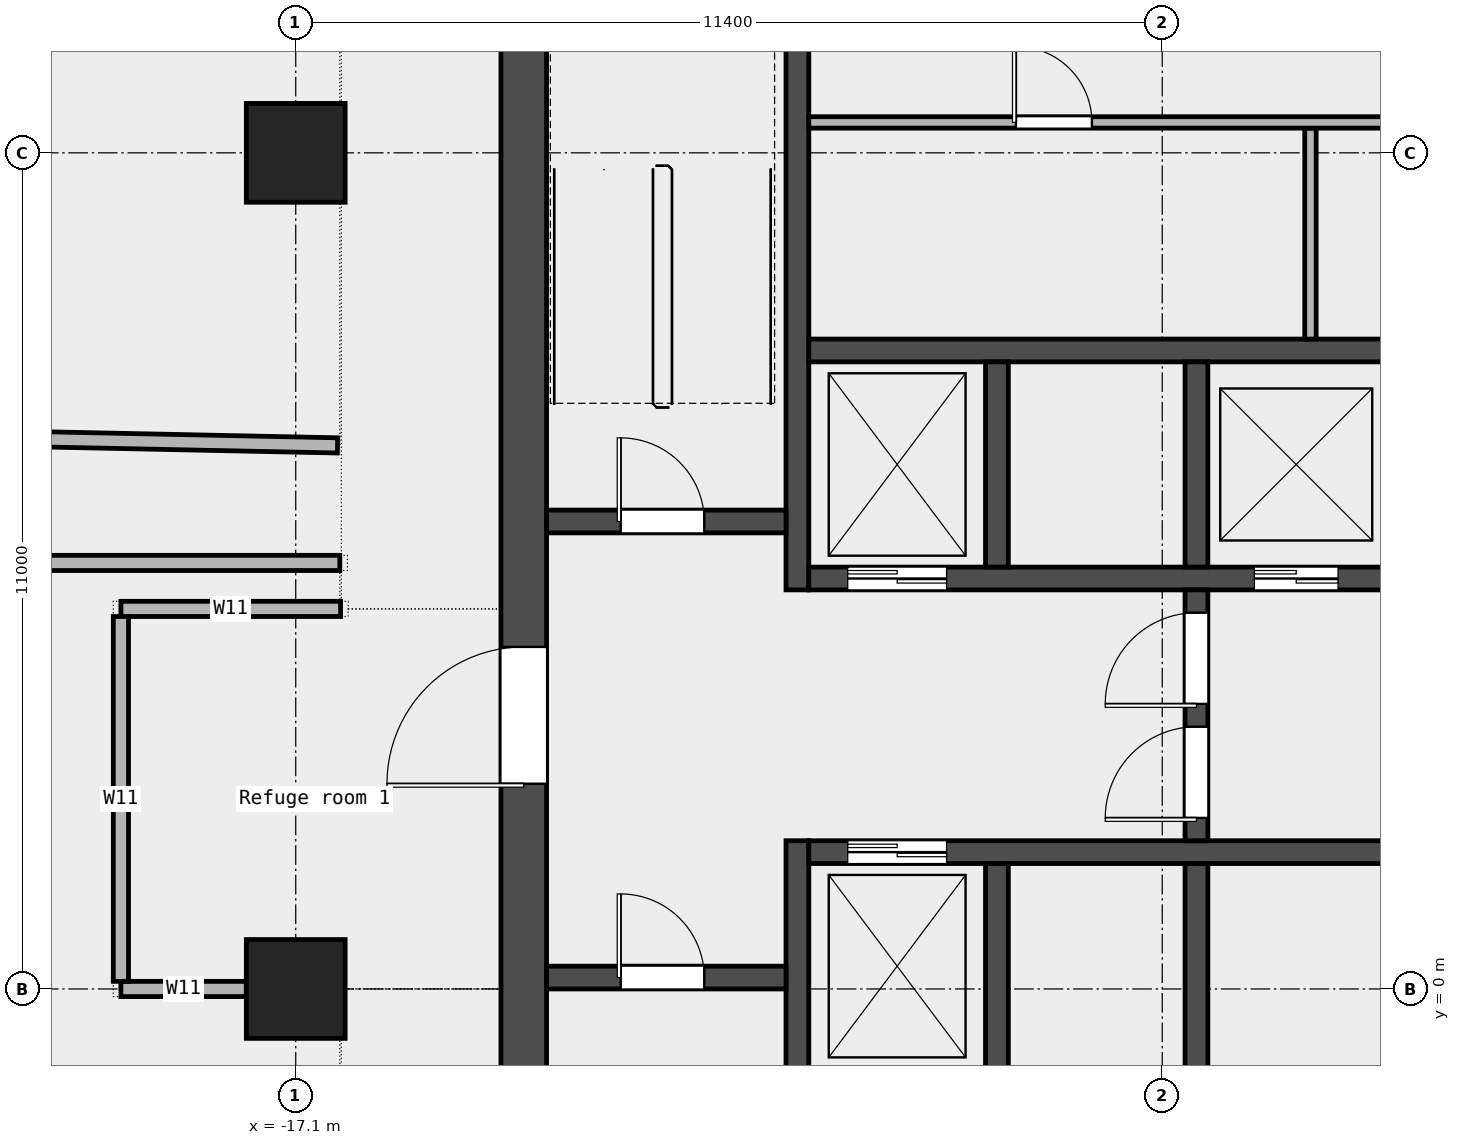
"""IFC4 building model, lengths in metres.
Left out: names, types, materials, properties, quantities, classifications, styles, units other than length and angle.
Written with IfcOpenShell. Run it as: python <this file> out.ifc"""

import sys

from ifc_helpers import new_model, si_unit, direction, frame, frame_2d, origin, origin_2d, place, context, subcontext, project, spatial, rectangle, extrude, element, fill, save


model = new_model("IFC4")
c1 = context("Model", 3, precision=1e-05, world=origin(), true_north=direction((0.0, 1.0)))
c2 = subcontext(c1, "Body", "Model", "MODEL_VIEW")
j1 = project(units=[si_unit("LENGTHUNIT", "METRE"), si_unit("PLANEANGLEUNIT", "RADIAN")], contexts=[c1])
p1 = place(None, origin())
s1 = spatial("IfcSite", under=j1, at=p1, CompositionType="ELEMENT")
p2 = place(p1, origin())
s2 = spatial("IfcBuilding", under=s1, at=p2, CompositionType="ELEMENT")
p3 = place(p2, frame((0.0, 0.0, 259.0)))
s3 = spatial("IfcBuildingStorey", under=s2, at=p3, CompositionType="ELEMENT", Elevation=259.0)
for number, where, z_axis, x_axis in (
    (1, (-17.1, 0.0, 0.0), (0.0, 0.0, 1.0), (1.0, 0.0, 0.0)),
    (2, (-17.1, 11.0, 0.0), (0.0, 0.0, 1.0), (1.0, 0.0, 0.0)),
):
    element("IfcColumn", number, at=place(p3, frame(where, z_axis=z_axis, x_axis=x_axis)), inside=s3, PredefinedType="COLUMN", context=c2, shape_type="SweptSolid", body=[
        extrude(rectangle(XDim=1.3, YDim=1.3, at=origin_2d()), origin(), (0.0, 0.0, 1.0), 8.0),
    ])
p4 = place(p3, frame((-19.4, 0.0, 0.0), z_axis=(0.0, 0.0, 1.0), x_axis=(1.0, 0.0, 0.0)))
e3 = element("IfcWall", 3, at=p4, inside=s3, PredefinedType="PARTITIONING", context=c2, shape_type="SweptSolid", body=[
    extrude(rectangle(XDim=1.65, YDim=0.2, at=frame_2d((0.825, 0.0))), origin(), (0.0, 0.0, 1.0), 8.0),
])
p5 = place(p3, frame((-19.4, 5.0, 0.0), z_axis=(0.0, 0.0, 1.0), x_axis=(1.0, 0.0, 0.0)))
e4 = element("IfcWall", 4, at=p5, inside=s3, PredefinedType="PARTITIONING", context=c2, shape_type="SweptSolid", body=[
    extrude(rectangle(XDim=2.89, YDim=0.2, at=frame_2d((1.445, 0.0))), origin(), (0.0, 0.0, 1.0), 8.0),
])
p6 = place(p3, frame((-26.45, 5.605, 0.0), z_axis=(0.0, 0.0, 1.0), x_axis=(1.0, 0.0, 0.0)))
e5 = element("IfcWall", 5, at=p6, inside=s3, PredefinedType="PARTITIONING", context=c2, shape_type="SweptSolid", body=[
    extrude(rectangle(XDim=9.93, YDim=0.2, at=frame_2d((4.965, 0.0))), origin(), (0.0, 0.0, 1.0), 8.0),
])
p7 = place(p3, frame((-19.4, 0.1, 0.0), z_axis=(0.0, 0.0, 1.0), x_axis=(0.0, 1.0, 0.0)))
e6 = element("IfcWall", 6, at=p7, inside=s3, PredefinedType="PARTITIONING", context=c2, shape_type="SweptSolid", body=[
    extrude(rectangle(XDim=4.8, YDim=0.2, at=frame_2d((2.4, 0.0))), origin(), (0.0, 0.0, 1.0), 8.0),
])
p8 = place(p3, frame((-16.55, 7.151, 0.0), z_axis=(0.0, 0.0, 1.0), x_axis=(-0.999787325343, 0.020622901905, 0.0)))
e7 = element("IfcWall", 7, at=p8, inside=s3, PredefinedType="PARTITIONING", context=c2, shape_type="SweptSolid", body=[
    extrude(rectangle(XDim=9.802, YDim=0.2, at=frame_2d((4.901, 0.0))), origin(), (0.0, 0.0, 1.0), 8.0),
])
p9 = place(p3, frame((-14.1, -6.6, 0.0), z_axis=(0.0, 0.0, 1.0), x_axis=(0.0, 1.0, 0.0)))
e8 = element("IfcWall", 8, at=p9, inside=s3, PredefinedType="SHEAR", context=c2, shape_type="SweptSolid", body=[
    extrude(rectangle(XDim=19.5, YDim=0.6, at=frame_2d((9.75, 0.0))), origin(), (0.0, 0.0, 1.0), 8.1),
])
p10 = place(p9, frame((9.3, 0.0, 0.0)))
e9 = element("IfcOpeningElement", 9, at=p10, cuts=e8, PredefinedType="OPENING", context=c2, shape_type="SweptSolid", body=[
    extrude(rectangle(XDim=1.8, YDim=2.1, at=frame_2d((0.9, 1.05))), frame((0.0, 0.312, 0.0), z_axis=(0.0, -1.0, 0.0), x_axis=(1.0, 0.0, 0.0)), (0.0, 0.0, 1.0), 0.624),
])
p11 = place(p3, frame((-10.5, -6.6, 0.0), z_axis=(0.0, 0.0, 1.0), x_axis=(0.0, 1.0, 0.0)))
e10 = element("IfcWall", 10, at=p11, inside=s3, PredefinedType="SHEAR", context=c2, shape_type="SweptSolid", body=[
    extrude(rectangle(XDim=8.55, YDim=0.3, at=frame_2d((4.275, 0.0))), origin(), (0.0, 0.0, 1.0), 8.1),
])
p12 = place(p3, frame((-10.5, 5.25, 0.0), z_axis=(0.0, 0.0, 1.0), x_axis=(0.0, 1.0, 0.0)))
e11 = element("IfcWall", 11, at=p12, inside=s3, PredefinedType="SHEAR", context=c2, shape_type="SweptSolid", body=[
    extrude(rectangle(XDim=7.65, YDim=0.3, at=frame_2d((3.825, 0.0))), origin(), (0.0, 0.0, 1.0), 8.1),
])
p13 = place(p3, frame((-13.8, 0.15, 0.0), z_axis=(0.0, 0.0, 1.0), x_axis=(1.0, 0.0, 0.0)))
e12 = element("IfcWall", 12, at=p13, inside=s3, PredefinedType="SOLIDWALL", context=c2, shape_type="SweptSolid", body=[
    extrude(rectangle(XDim=3.15, YDim=0.3, at=frame_2d((1.575, 0.0))), origin(), (0.0, 0.0, 1.0), 8.1),
])
p14 = place(p13, frame((0.975, 0.0, 0.0)))
e13 = element("IfcOpeningElement", 13, at=p14, cuts=e12, PredefinedType="OPENING", context=c2, shape_type="SweptSolid", body=[
    extrude(rectangle(XDim=1.1, YDim=2.1, at=frame_2d((0.55, 1.05))), frame((0.0, 0.162, 0.0), z_axis=(0.0, -1.0, 0.0), x_axis=(1.0, 0.0, 0.0)), (0.0, 0.0, 1.0), 0.324),
])
p15 = place(p3, frame((-13.8, 6.15, 0.0), z_axis=(0.0, 0.0, 1.0), x_axis=(1.0, 0.0, 0.0)))
e14 = element("IfcWall", 14, at=p15, inside=s3, PredefinedType="SOLIDWALL", context=c2, shape_type="SweptSolid", body=[
    extrude(rectangle(XDim=3.15, YDim=0.3, at=frame_2d((1.575, 0.0))), origin(), (0.0, 0.0, 1.0), 8.1),
])
p16 = place(p15, frame((0.975, 0.0, 0.0)))
e15 = element("IfcOpeningElement", 15, at=p16, cuts=e14, PredefinedType="OPENING", context=c2, shape_type="SweptSolid", body=[
    extrude(rectangle(XDim=1.1, YDim=2.1, at=frame_2d((0.55, 1.05))), frame((0.0, 0.162, 0.0), z_axis=(0.0, -1.0, 0.0), x_axis=(1.0, 0.0, 0.0)), (0.0, 0.0, 1.0), 0.324),
])
p17 = place(p3, frame((-10.35, 1.8, 0.0), z_axis=(0.0, 0.0, 1.0), x_axis=(1.0, 0.0, 0.0)))
e16 = element("IfcWall", 16, at=p17, inside=s3, PredefinedType="SOLIDWALL", context=c2, shape_type="SweptSolid", body=[
    extrude(rectangle(XDim=20.7, YDim=0.3, at=frame_2d((10.35, 0.0))), origin(), (0.0, 0.0, 1.0), 8.1),
])
p18 = place(p17, frame((0.512, 0.0, 0.0)))
e17 = element("IfcOpeningElement", 17, at=p18, cuts=e16, PredefinedType="OPENING", context=c2, shape_type="SweptSolid", body=[
    extrude(rectangle(XDim=1.3, YDim=2.1, at=frame_2d((0.65, 1.05))), frame((0.0, 0.162, 0.0), z_axis=(0.0, -1.0, 0.0), x_axis=(1.0, 0.0, 0.0)), (0.0, 0.0, 1.0), 0.324),
])
p19 = place(p17, frame((8.538, 0.0, 0.0)))
e18 = element("IfcOpeningElement", 18, at=p19, cuts=e16, PredefinedType="OPENING", context=c2, shape_type="SweptSolid", body=[
    extrude(rectangle(XDim=1.0, YDim=2.1, at=frame_2d((0.5, 1.05))), frame((0.0, 0.162, 0.0), z_axis=(0.0, -1.0, 0.0), x_axis=(1.0, 0.0, 0.0)), (0.0, 0.0, 1.0), 0.324),
])
p20 = place(p17, frame((15.1, 0.0, 0.0)))
e19 = element("IfcOpeningElement", 19, at=p20, cuts=e16, PredefinedType="OPENING", context=c2, shape_type="SweptSolid", body=[
    extrude(rectangle(XDim=1.0, YDim=2.1, at=frame_2d((0.5, 1.05))), frame((0.0, 0.162, 0.0), z_axis=(0.0, -1.0, 0.0), x_axis=(1.0, 0.0, 0.0)), (0.0, 0.0, 1.0), 0.324),
])
p21 = place(p17, frame((19.038, 0.0, 0.0)))
e20 = element("IfcOpeningElement", 20, at=p21, cuts=e16, PredefinedType="OPENING", context=c2, shape_type="SweptSolid", body=[
    extrude(rectangle(XDim=1.0, YDim=2.1, at=frame_2d((0.5, 1.05))), frame((0.0, 0.162, 0.0), z_axis=(0.0, -1.0, 0.0), x_axis=(1.0, 0.0, 0.0)), (0.0, 0.0, 1.0), 0.324),
])
p22 = place(p3, frame((-10.35, 5.4, 0.0), z_axis=(0.0, 0.0, 1.0), x_axis=(1.0, 0.0, 0.0)))
e21 = element("IfcWall", 21, at=p22, inside=s3, PredefinedType="SOLIDWALL", context=c2, shape_type="SweptSolid", body=[
    extrude(rectangle(XDim=20.7, YDim=0.3, at=frame_2d((10.35, 0.0))), origin(), (0.0, 0.0, 1.0), 8.1),
])
p23 = place(p22, frame((0.512, 0.0, 0.0)))
e22 = element("IfcOpeningElement", 22, at=p23, cuts=e21, PredefinedType="OPENING", context=c2, shape_type="SweptSolid", body=[
    extrude(rectangle(XDim=1.3, YDim=2.1, at=frame_2d((0.65, 1.05))), frame((0.0, 0.162, 0.0), z_axis=(0.0, -1.0, 0.0), x_axis=(1.0, 0.0, 0.0)), (0.0, 0.0, 1.0), 0.324),
])
p24 = place(p22, frame((5.863, 0.0, 0.0)))
e23 = element("IfcOpeningElement", 23, at=p24, cuts=e21, PredefinedType="OPENING", context=c2, shape_type="SweptSolid", body=[
    extrude(rectangle(XDim=1.1, YDim=2.1, at=frame_2d((0.55, 1.05))), frame((0.0, 0.162, 0.0), z_axis=(0.0, -1.0, 0.0), x_axis=(1.0, 0.0, 0.0)), (0.0, 0.0, 1.0), 0.324),
])
p25 = place(p22, frame((8.488, 0.0, 0.0)))
e24 = element("IfcOpeningElement", 24, at=p25, cuts=e21, PredefinedType="OPENING", context=c2, shape_type="SweptSolid", body=[
    extrude(rectangle(XDim=1.1, YDim=2.1, at=frame_2d((0.55, 1.05))), frame((0.0, 0.162, 0.0), z_axis=(0.0, -1.0, 0.0), x_axis=(1.0, 0.0, 0.0)), (0.0, 0.0, 1.0), 0.324),
])
p26 = place(p22, frame((11.113, 0.0, 0.0)))
e25 = element("IfcOpeningElement", 25, at=p26, cuts=e21, PredefinedType="OPENING", context=c2, shape_type="SweptSolid", body=[
    extrude(rectangle(XDim=1.1, YDim=2.1, at=frame_2d((0.55, 1.05))), frame((0.0, 0.162, 0.0), z_axis=(0.0, -1.0, 0.0), x_axis=(1.0, 0.0, 0.0)), (0.0, 0.0, 1.0), 0.324),
])
p27 = place(p22, frame((13.738, 0.0, 0.0)))
e26 = element("IfcOpeningElement", 26, at=p27, cuts=e21, PredefinedType="OPENING", context=c2, shape_type="SweptSolid", body=[
    extrude(rectangle(XDim=1.1, YDim=2.1, at=frame_2d((0.55, 1.05))), frame((0.0, 0.162, 0.0), z_axis=(0.0, -1.0, 0.0), x_axis=(1.0, 0.0, 0.0)), (0.0, 0.0, 1.0), 0.324),
])
p28 = place(p22, frame((16.363, 0.0, 0.0)))
e27 = element("IfcOpeningElement", 27, at=p28, cuts=e21, PredefinedType="OPENING", context=c2, shape_type="SweptSolid", body=[
    extrude(rectangle(XDim=1.1, YDim=2.1, at=frame_2d((0.55, 1.05))), frame((0.0, 0.162, 0.0), z_axis=(0.0, -1.0, 0.0), x_axis=(1.0, 0.0, 0.0)), (0.0, 0.0, 1.0), 0.324),
])
p29 = place(p22, frame((18.988, 0.0, 0.0)))
e28 = element("IfcOpeningElement", 28, at=p29, cuts=e21, PredefinedType="OPENING", context=c2, shape_type="SweptSolid", body=[
    extrude(rectangle(XDim=1.1, YDim=2.1, at=frame_2d((0.55, 1.05))), frame((0.0, 0.162, 0.0), z_axis=(0.0, -1.0, 0.0), x_axis=(1.0, 0.0, 0.0)), (0.0, 0.0, 1.0), 0.324),
])
p30 = place(p3, frame((-10.35, 8.4, 0.0), z_axis=(0.0, 0.0, 1.0), x_axis=(1.0, 0.0, 0.0)))
e29 = element("IfcWall", 29, at=p30, inside=s3, PredefinedType="SOLIDWALL", context=c2, shape_type="SweptSolid", body=[
    extrude(rectangle(XDim=20.7, YDim=0.3, at=frame_2d((10.35, 0.0))), origin(), (0.0, 0.0, 1.0), 8.1),
])
for number, where, z_axis, x_axis in (
    (30, (-7.875, -1.05, 0.0), (0.0, 0.0, 1.0), (0.0, 1.0, 0.0)),
    (31, (-5.25, -1.05, 0.0), (0.0, 0.0, 1.0), (0.0, 1.0, 0.0)),
    (32, (-7.875, 5.55, 0.0), (0.0, 0.0, 1.0), (0.0, 1.0, 0.0)),
    (33, (-5.25, 5.55, 0.0), (0.0, 0.0, 1.0), (0.0, 1.0, 0.0)),
):
    element("IfcWall", number, at=place(p3, frame(where, z_axis=z_axis, x_axis=x_axis)), inside=s3, PredefinedType="SOLIDWALL", context=c2, shape_type="SweptSolid", body=[
        extrude(rectangle(XDim=2.7, YDim=0.3, at=frame_2d((1.35, 0.0))), origin(), (0.0, 0.0, 1.0), 8.1),
    ])
p31 = place(p3, frame((-5.25, 1.95, 0.0), z_axis=(0.0, 0.0, 1.0), x_axis=(0.0, 1.0, 0.0)))
e34 = element("IfcWall", 34, at=p31, inside=s3, PredefinedType="SOLIDWALL", context=c2, shape_type="SweptSolid", body=[
    extrude(rectangle(XDim=3.3, YDim=0.3, at=frame_2d((1.65, 0.0))), origin(), (0.0, 0.0, 1.0), 8.1),
])
p32 = place(p31, frame((0.3, 0.0, 0.0)))
e35 = element("IfcOpeningElement", 35, at=p32, cuts=e34, PredefinedType="OPENING", context=c2, shape_type="SweptSolid", body=[
    extrude(rectangle(XDim=1.2, YDim=2.1, at=frame_2d((0.6, 1.05))), frame((0.0, 0.162, 0.0), z_axis=(0.0, -1.0, 0.0), x_axis=(1.0, 0.0, 0.0)), (0.0, 0.0, 1.0), 0.324),
])
p33 = place(p31, frame((1.8, 0.0, 0.0)))
e36 = element("IfcOpeningElement", 36, at=p33, cuts=e34, PredefinedType="OPENING", context=c2, shape_type="SweptSolid", body=[
    extrude(rectangle(XDim=1.2, YDim=2.1, at=frame_2d((0.6, 1.05))), frame((0.0, 0.162, 0.0), z_axis=(0.0, -1.0, 0.0), x_axis=(1.0, 0.0, 0.0)), (0.0, 0.0, 1.0), 0.324),
])
p34 = place(p3, frame((-3.75, 8.55, 0.0), z_axis=(0.0, 0.0, 1.0), x_axis=(0.0, 1.0, 0.0)))
e37 = element("IfcWall", 37, at=p34, inside=s3, PredefinedType="PARTITIONING", context=c2, shape_type="SweptSolid", body=[
    extrude(rectangle(XDim=2.775, YDim=0.15, at=frame_2d((1.387, 0.0))), origin(), (0.0, 0.0, 1.0), 8.1),
])
p35 = place(p3, frame((-10.35, 11.4, 0.0), z_axis=(0.0, 0.0, 1.0), x_axis=(1.0, 0.0, 0.0)))
e38 = element("IfcWall", 38, at=p35, inside=s3, PredefinedType="PARTITIONING", context=c2, shape_type="SweptSolid", body=[
    extrude(rectangle(XDim=20.7, YDim=0.15, at=frame_2d((10.35, 0.0))), origin(), (0.0, 0.0, 1.0), 8.1),
])
p36 = place(p35, frame((2.725, 0.0, 0.0)))
e39 = element("IfcOpeningElement", 39, at=p36, cuts=e38, PredefinedType="OPENING", context=c2, shape_type="SweptSolid", body=[
    extrude(rectangle(XDim=1.0, YDim=2.1, at=frame_2d((0.5, 1.05))), frame((0.0, 0.087, 0.0), z_axis=(0.0, -1.0, 0.0), x_axis=(1.0, 0.0, 0.0)), (0.0, 0.0, 1.0), 0.174),
])
p37 = place(p35, frame((9.475, 0.0, 0.0)))
e40 = element("IfcOpeningElement", 40, at=p37, cuts=e38, PredefinedType="OPENING", context=c2, shape_type="SweptSolid", body=[
    extrude(rectangle(XDim=1.0, YDim=2.1, at=frame_2d((0.5, 1.05))), frame((0.0, 0.087, 0.0), z_axis=(0.0, -1.0, 0.0), x_axis=(1.0, 0.0, 0.0)), (0.0, 0.0, 1.0), 0.174),
])
p38 = place(p35, frame((16.6, 0.0, 0.0)))
e41 = element("IfcOpeningElement", 41, at=p38, cuts=e38, PredefinedType="OPENING", context=c2, shape_type="SweptSolid", body=[
    extrude(rectangle(XDim=1.0, YDim=2.1, at=frame_2d((0.5, 1.05))), frame((0.0, 0.087, 0.0), z_axis=(0.0, -1.0, 0.0), x_axis=(1.0, 0.0, 0.0)), (0.0, 0.0, 1.0), 0.174),
])
p39 = place(p14, origin())
e42 = element("IfcDoor", 42, at=p39, inside=s3, OperationType="SINGLE_SWING_LEFT", PredefinedType="DOOR", context=c2, shape_type="SweptSolid", body=[
    extrude(rectangle(XDim=1.1, YDim=2.1, at=frame_2d((0.55, 1.05))), frame((0.0, 0.025, 0.0), z_axis=(0.0, -1.0, 0.0), x_axis=(1.0, 0.0, 0.0)), (0.0, 0.0, 1.0), 0.05),
])
fill(e13, e42)
p40 = place(p16, origin())
e43 = element("IfcDoor", 43, at=p40, inside=s3, OperationType="SINGLE_SWING_LEFT", PredefinedType="DOOR", context=c2, shape_type="SweptSolid", body=[
    extrude(rectangle(XDim=1.1, YDim=2.1, at=frame_2d((0.55, 1.05))), frame((0.0, 0.025, 0.0), z_axis=(0.0, -1.0, 0.0), x_axis=(1.0, 0.0, 0.0)), (0.0, 0.0, 1.0), 0.05),
])
fill(e15, e43)
p41 = place(p10, origin())
e44 = element("IfcDoor", 44, at=p41, inside=s3, OperationType="DOUBLE_DOOR_SINGLE_SWING", PredefinedType="DOOR", context=c2, shape_type="SweptSolid", body=[
    extrude(rectangle(XDim=1.8, YDim=2.1, at=frame_2d((0.9, 1.05))), frame((0.0, 0.025, 0.0), z_axis=(0.0, -1.0, 0.0), x_axis=(1.0, 0.0, 0.0)), (0.0, 0.0, 1.0), 0.05),
])
fill(e9, e44)
p42 = place(p32, origin())
e45 = element("IfcDoor", 45, at=p42, inside=s3, OperationType="SINGLE_SWING_LEFT", PredefinedType="DOOR", context=c2, shape_type="SweptSolid", body=[
    extrude(rectangle(XDim=1.2, YDim=2.1, at=frame_2d((0.6, 1.05))), frame((0.0, 0.025, 0.0), z_axis=(0.0, -1.0, 0.0), x_axis=(1.0, 0.0, 0.0)), (0.0, 0.0, 1.0), 0.05),
])
fill(e35, e45)
p43 = place(p33, origin())
e46 = element("IfcDoor", 46, at=p43, inside=s3, OperationType="SINGLE_SWING_RIGHT", PredefinedType="DOOR", context=c2, shape_type="SweptSolid", body=[
    extrude(rectangle(XDim=1.2, YDim=2.1, at=frame_2d((0.6, 1.05))), frame((0.0, 0.025, 0.0), z_axis=(0.0, -1.0, 0.0), x_axis=(1.0, 0.0, 0.0)), (0.0, 0.0, 1.0), 0.05),
])
fill(e36, e46)
p44 = place(p18, origin())
e47 = element("IfcDoor", 47, at=p44, inside=s3, OperationType="DOUBLE_DOOR_SLIDING", PredefinedType="DOOR", context=c2, shape_type="SweptSolid", body=[
    extrude(rectangle(XDim=1.3, YDim=2.1, at=frame_2d((0.65, 1.05))), frame((0.0, 0.025, 0.0), z_axis=(0.0, -1.0, 0.0), x_axis=(1.0, 0.0, 0.0)), (0.0, 0.0, 1.0), 0.05),
])
fill(e17, e47)
p45 = place(p23, origin())
e48 = element("IfcDoor", 48, at=p45, inside=s3, OperationType="DOUBLE_DOOR_SLIDING", PredefinedType="DOOR", context=c2, shape_type="SweptSolid", body=[
    extrude(rectangle(XDim=1.3, YDim=2.1, at=frame_2d((0.65, 1.05))), frame((0.0, 0.025, 0.0), z_axis=(0.0, -1.0, 0.0), x_axis=(1.0, 0.0, 0.0)), (0.0, 0.0, 1.0), 0.05),
])
fill(e22, e48)
p46 = place(p24, origin())
e49 = element("IfcDoor", 49, at=p46, inside=s3, OperationType="DOUBLE_DOOR_SLIDING", PredefinedType="DOOR", context=c2, shape_type="SweptSolid", body=[
    extrude(rectangle(XDim=1.1, YDim=2.1, at=frame_2d((0.55, 1.05))), frame((0.0, 0.025, 0.0), z_axis=(0.0, -1.0, 0.0), x_axis=(1.0, 0.0, 0.0)), (0.0, 0.0, 1.0), 0.05),
])
fill(e23, e49)
p47 = place(p36, origin())
e50 = element("IfcDoor", 50, at=p47, inside=s3, OperationType="SINGLE_SWING_LEFT", PredefinedType="DOOR", context=c2, shape_type="SweptSolid", body=[
    extrude(rectangle(XDim=1.0, YDim=2.1, at=frame_2d((0.5, 1.05))), frame((0.0, 0.025, 0.0), z_axis=(0.0, -1.0, 0.0), x_axis=(1.0, 0.0, 0.0)), (0.0, 0.0, 1.0), 0.05),
])
fill(e39, e50)
save(model, sys.argv[1])
